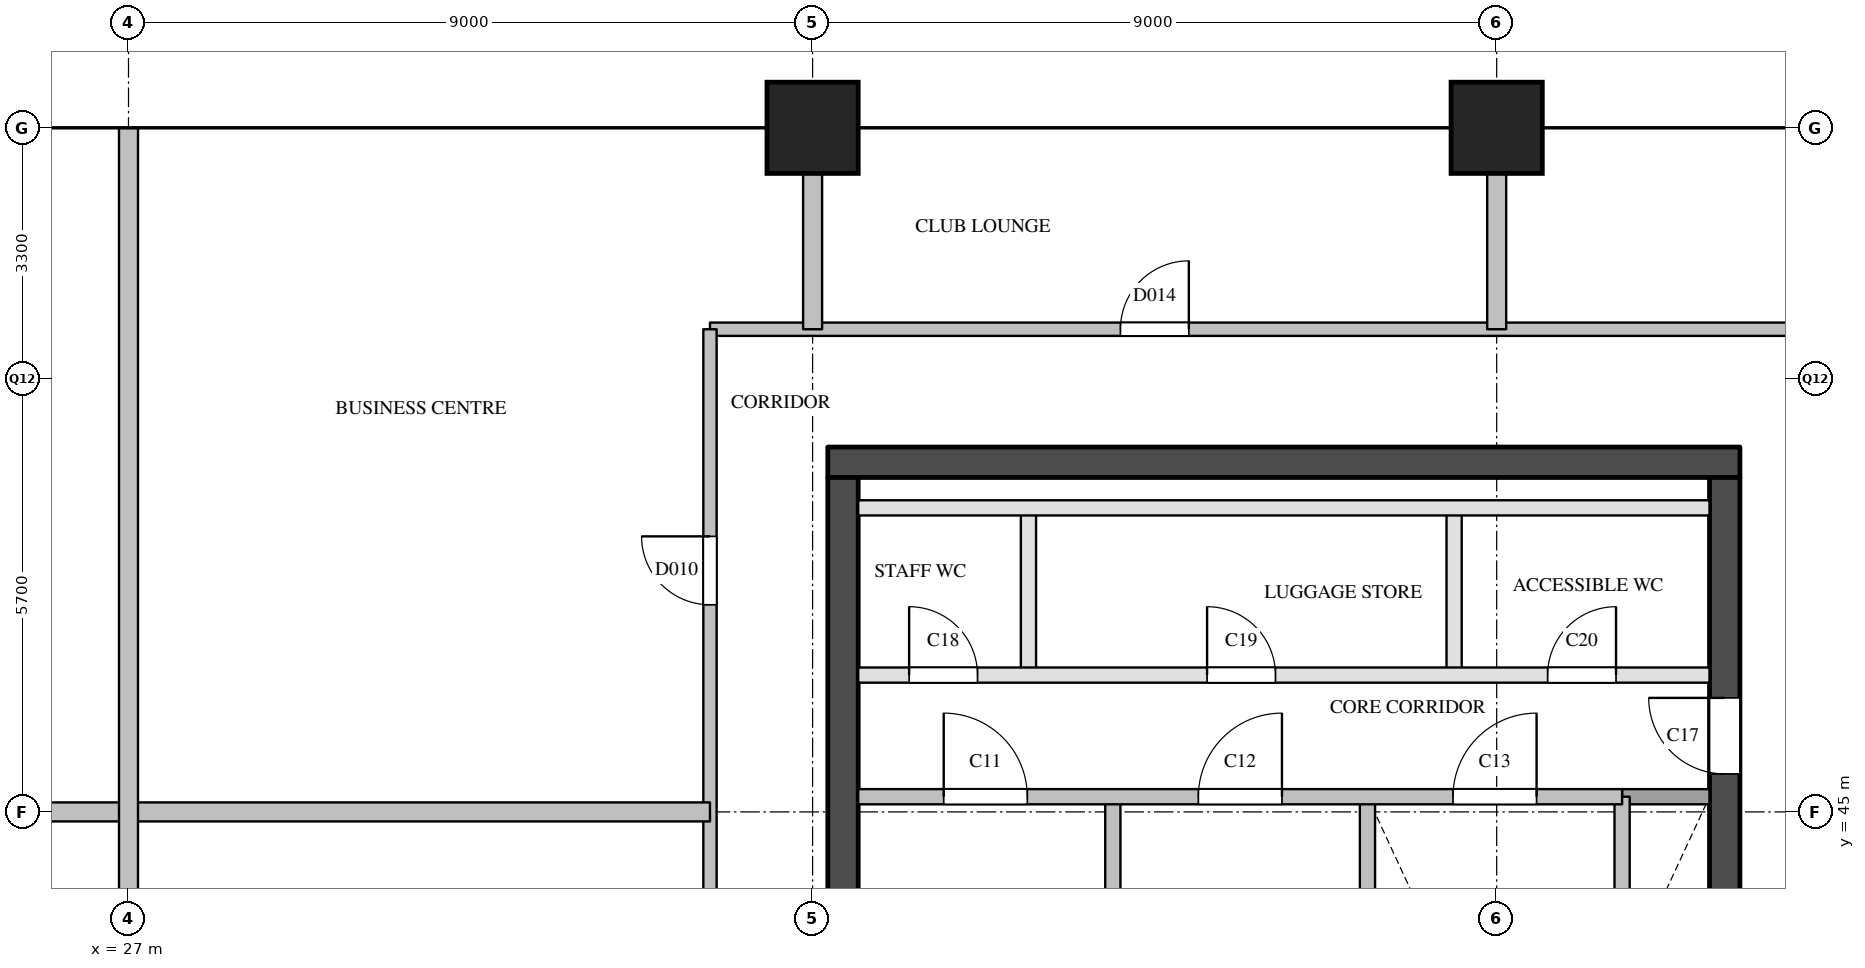
"""IFC4 building model, lengths in metres.
Left out: names, types, materials, properties, quantities, classifications, styles, units other than length and angle.
Written with IfcOpenShell. Run it as: python <this file> out.ifc"""

import sys

from ifc_helpers import new_model, si_unit, direction, frame, frame_2d, origin, origin_2d, place, context, subcontext, project, spatial, rectangle, extrude, element, fill, save


model = new_model("IFC4")
c1 = context("Model", 3, precision=1e-05, world=origin(), true_north=direction((0.0, 1.0)))
c2 = subcontext(c1, "Body", "Model", "MODEL_VIEW")
j1 = project(units=[si_unit("LENGTHUNIT", "METRE"), si_unit("PLANEANGLEUNIT", "RADIAN")], contexts=[c1])
p1 = place(None, origin())
s1 = spatial("IfcSite", under=j1, at=p1, CompositionType="ELEMENT")
p2 = place(p1, origin())
s2 = spatial("IfcBuilding", under=s1, at=p2, CompositionType="ELEMENT")
p3 = place(p2, frame((0.0, 0.0, 230.6)))
s3 = spatial("IfcBuildingStorey", under=s2, at=p3, CompositionType="ELEMENT", Elevation=230.6)
for number, where, z_axis, x_axis in (
    (1, (36.0, 54.0, 0.0), (0.0, 0.0, 1.0), (1.0, 0.0, 0.0)),
    (2, (45.0, 54.0, 0.0), (0.0, 0.0, 1.0), (1.0, 0.0, 0.0)),
):
    element("IfcColumn", number, at=place(p3, frame(where, z_axis=z_axis, x_axis=x_axis)), inside=s3, PredefinedType="COLUMN", context=c2, shape_type="SweptSolid", body=[
        extrude(rectangle(XDim=1.2, YDim=1.2, at=origin_2d()), origin(), (0.0, 0.0, 1.0), 3.9),
    ])
p4 = place(p3, frame((36.2, 49.6, 0.0), z_axis=(0.0, 0.0, 1.0), x_axis=(1.0, 0.0, 0.0)))
e3 = element("IfcWall", 3, at=p4, inside=s3, PredefinedType="SHEAR", context=c2, shape_type="SweptSolid", body=[
    extrude(rectangle(XDim=12.0, YDim=0.4, at=frame_2d((6.0, 0.0))), origin(), (0.0, 0.0, 1.0), 3.6),
])
p5 = place(p3, frame((36.4, 29.1, 0.0), z_axis=(0.0, 0.0, 1.0), x_axis=(0.0, 1.0, 0.0)))
e4 = element("IfcWall", 4, at=p5, inside=s3, PredefinedType="SHEAR", context=c2, shape_type="SweptSolid", body=[
    extrude(rectangle(XDim=20.3, YDim=0.4, at=frame_2d((10.15, 0.0))), origin(), (0.0, 0.0, 1.0), 3.6),
])
p6 = place(p5, frame((3.6, 0.0, 0.0)))
e5 = element("IfcOpeningElement", 5, at=p6, cuts=e4, PredefinedType="OPENING", context=c2, shape_type="SweptSolid", body=[
    extrude(rectangle(XDim=1.8, YDim=2.1, at=frame_2d((0.9, 1.05))), frame((0.0, 0.21, 0.0), z_axis=(0.0, -1.0, 0.0), x_axis=(1.0, 0.0, 0.0)), (0.0, 0.0, 1.0), 0.42),
])
p7 = place(p3, frame((48.0, 29.1, 0.0), z_axis=(0.0, 0.0, 1.0), x_axis=(0.0, 1.0, 0.0)))
e6 = element("IfcWall", 6, at=p7, inside=s3, PredefinedType="SHEAR", context=c2, shape_type="SweptSolid", body=[
    extrude(rectangle(XDim=20.3, YDim=0.4, at=frame_2d((10.15, 0.0))), origin(), (0.0, 0.0, 1.0), 3.6),
])
p8 = place(p7, frame((12.5, 0.0, 0.0)))
e7 = element("IfcOpeningElement", 7, at=p8, cuts=e6, PredefinedType="OPENING", context=c2, shape_type="SweptSolid", body=[
    extrude(rectangle(XDim=0.7, YDim=2.1, at=frame_2d((0.35, 1.05))), frame((0.0, 0.21, 0.0), z_axis=(0.0, -1.0, 0.0), x_axis=(1.0, 0.0, 0.0)), (0.0, 0.0, 1.0), 0.42),
])
p9 = place(p7, frame((3.9, 0.0, 0.0)))
e8 = element("IfcOpeningElement", 8, at=p9, cuts=e6, PredefinedType="OPENING", context=c2, shape_type="SweptSolid", body=[
    extrude(rectangle(XDim=1.8, YDim=2.1, at=frame_2d((0.9, 1.05))), frame((0.0, 0.21, 0.0), z_axis=(0.0, -1.0, 0.0), x_axis=(1.0, 0.0, 0.0)), (0.0, 0.0, 1.0), 0.42),
])
p10 = place(p7, frame((16.4, 0.0, 0.0)))
e9 = element("IfcOpeningElement", 9, at=p10, cuts=e6, PredefinedType="OPENING", context=c2, shape_type="SweptSolid", body=[
    extrude(rectangle(XDim=1.0, YDim=2.1, at=frame_2d((0.5, 1.05))), frame((0.0, 0.21, 0.0), z_axis=(0.0, -1.0, 0.0), x_axis=(1.0, 0.0, 0.0)), (0.0, 0.0, 1.0), 0.42),
])
p11 = place(p3, frame((38.84, 46.8, 0.0), z_axis=(0.0, 0.0, 1.0), x_axis=(0.0, 1.0, 0.0)))
e10 = element("IfcWall", 10, at=p11, inside=s3, PredefinedType="PARTITIONING", context=c2, shape_type="SweptSolid", body=[
    extrude(rectangle(XDim=2.2, YDim=0.2, at=frame_2d((1.1, 0.0))), origin(), (0.0, 0.0, 1.0), 3.6),
])
for number, where, z_axis, x_axis in (
    (11, (39.95, 40.78, 0.0), (0.0, 0.0, 1.0), (0.0, 1.0, 0.0)),
    (12, (43.3, 40.78, 0.0), (0.0, 0.0, 1.0), (0.0, 1.0, 0.0)),
):
    element("IfcWall", number, at=place(p3, frame(where, z_axis=z_axis, x_axis=x_axis)), inside=s3, PredefinedType="SOLIDWALL", context=c2, shape_type="SweptSolid", body=[
        extrude(rectangle(XDim=4.42, YDim=0.2, at=frame_2d((2.21, 0.0))), origin(), (0.0, 0.0, 1.0), 3.6),
    ])
p12 = place(p3, frame((44.44, 46.8, 0.0), z_axis=(0.0, 0.0, 1.0), x_axis=(0.0, 1.0, 0.0)))
e13 = element("IfcWall", 13, at=p12, inside=s3, PredefinedType="PARTITIONING", context=c2, shape_type="SweptSolid", body=[
    extrude(rectangle(XDim=2.2, YDim=0.2, at=frame_2d((1.1, 0.0))), origin(), (0.0, 0.0, 1.0), 3.6),
])
p13 = place(p3, frame((46.65, 40.78, 0.0), z_axis=(0.0, 0.0, 1.0), x_axis=(0.0, 1.0, 0.0)))
e14 = element("IfcWall", 14, at=p13, inside=s3, PredefinedType="SOLIDWALL", context=c2, shape_type="SweptSolid", body=[
    extrude(rectangle(XDim=4.42, YDim=0.2, at=frame_2d((2.21, 0.0))), origin(), (0.0, 0.0, 1.0), 3.6),
])
p14 = place(p3, frame((46.65, 45.2, 0.0), z_axis=(0.0, 0.0, 1.0), x_axis=(1.0, 0.0, 0.0)))
e15 = element("IfcWall", 15, at=p14, inside=s3, PredefinedType="SOLIDWALL", context=c2, shape_type="SweptSolid", body=[
    extrude(rectangle(XDim=1.15, YDim=0.2, at=frame_2d((0.575, 0.0))), origin(), (0.0, 0.0, 1.0), 3.6),
])
p15 = place(p3, frame((36.6, 45.2, 0.0), z_axis=(0.0, 0.0, 1.0), x_axis=(1.0, 0.0, 0.0)))
e16 = element("IfcWall", 16, at=p15, inside=s3, PredefinedType="SOLIDWALL", context=c2, shape_type="SweptSolid", body=[
    extrude(rectangle(XDim=10.05, YDim=0.2, at=frame_2d((5.025, 0.0))), origin(), (0.0, 0.0, 1.0), 3.6),
])
p16 = place(p15, frame((1.125, 0.0, 0.0)))
e17 = element("IfcOpeningElement", 17, at=p16, cuts=e16, PredefinedType="OPENING", context=c2, shape_type="SweptSolid", body=[
    extrude(rectangle(XDim=1.1, YDim=2.1, at=frame_2d((0.55, 1.05))), frame((0.0, 0.11, 0.0), z_axis=(0.0, -1.0, 0.0), x_axis=(1.0, 0.0, 0.0)), (0.0, 0.0, 1.0), 0.22),
])
p17 = place(p15, frame((4.475, 0.0, 0.0)))
e18 = element("IfcOpeningElement", 18, at=p17, cuts=e16, PredefinedType="OPENING", context=c2, shape_type="SweptSolid", body=[
    extrude(rectangle(XDim=1.1, YDim=2.1, at=frame_2d((0.55, 1.05))), frame((0.0, 0.11, 0.0), z_axis=(0.0, -1.0, 0.0), x_axis=(1.0, 0.0, 0.0)), (0.0, 0.0, 1.0), 0.22),
])
p18 = place(p15, frame((7.825, 0.0, 0.0)))
e19 = element("IfcOpeningElement", 19, at=p18, cuts=e16, PredefinedType="OPENING", context=c2, shape_type="SweptSolid", body=[
    extrude(rectangle(XDim=1.1, YDim=2.1, at=frame_2d((0.55, 1.05))), frame((0.0, 0.11, 0.0), z_axis=(0.0, -1.0, 0.0), x_axis=(1.0, 0.0, 0.0)), (0.0, 0.0, 1.0), 0.22),
])
p19 = place(p3, frame((36.6, 46.8, 0.0), z_axis=(0.0, 0.0, 1.0), x_axis=(1.0, 0.0, 0.0)))
e20 = element("IfcWall", 20, at=p19, inside=s3, PredefinedType="PARTITIONING", context=c2, shape_type="SweptSolid", body=[
    extrude(rectangle(XDim=11.2, YDim=0.2, at=frame_2d((5.6, 0.0))), origin(), (0.0, 0.0, 1.0), 3.6),
])
p20 = place(p19, frame((0.67, 0.0, 0.0)))
e21 = element("IfcOpeningElement", 21, at=p20, cuts=e20, PredefinedType="OPENING", context=c2, shape_type="SweptSolid", body=[
    extrude(rectangle(XDim=0.9, YDim=2.1, at=frame_2d((0.45, 1.05))), frame((0.0, 0.11, 0.0), z_axis=(0.0, -1.0, 0.0), x_axis=(1.0, 0.0, 0.0)), (0.0, 0.0, 1.0), 0.22),
])
p21 = place(p19, frame((4.59, 0.0, 0.0)))
e22 = element("IfcOpeningElement", 22, at=p21, cuts=e20, PredefinedType="OPENING", context=c2, shape_type="SweptSolid", body=[
    extrude(rectangle(XDim=0.9, YDim=2.1, at=frame_2d((0.45, 1.05))), frame((0.0, 0.11, 0.0), z_axis=(0.0, -1.0, 0.0), x_axis=(1.0, 0.0, 0.0)), (0.0, 0.0, 1.0), 0.22),
])
p22 = place(p19, frame((9.07, 0.0, 0.0)))
e23 = element("IfcOpeningElement", 23, at=p22, cuts=e20, PredefinedType="OPENING", context=c2, shape_type="SweptSolid", body=[
    extrude(rectangle(XDim=0.9, YDim=2.1, at=frame_2d((0.45, 1.05))), frame((0.0, 0.11, 0.0), z_axis=(0.0, -1.0, 0.0), x_axis=(1.0, 0.0, 0.0)), (0.0, 0.0, 1.0), 0.22),
])
p23 = place(p3, frame((36.6, 49.0, 0.0), z_axis=(0.0, 0.0, 1.0), x_axis=(1.0, 0.0, 0.0)))
e24 = element("IfcWall", 24, at=p23, inside=s3, PredefinedType="PARTITIONING", context=c2, shape_type="SweptSolid", body=[
    extrude(rectangle(XDim=11.2, YDim=0.2, at=frame_2d((5.6, 0.0))), origin(), (0.0, 0.0, 1.0), 3.6),
])
p24 = place(p3, frame((34.65, 51.35, 0.0), z_axis=(0.0, 0.0, 1.0), x_axis=(1.0, 0.0, 0.0)))
e25 = element("IfcWall", 25, at=p24, inside=s3, PredefinedType="PARTITIONING", context=c2, shape_type="SweptSolid", body=[
    extrude(rectangle(XDim=15.1, YDim=0.175, at=frame_2d((7.55, 0.0))), origin(), (0.0, 0.0, 1.0), 3.6),
])
p25 = place(p24, frame((5.4, 0.0, 0.0)))
e26 = element("IfcOpeningElement", 26, at=p25, cuts=e25, PredefinedType="OPENING", context=c2, shape_type="SweptSolid", body=[
    extrude(rectangle(XDim=0.9, YDim=2.1, at=frame_2d((0.45, 1.05))), frame((0.0, 0.097, 0.0), z_axis=(0.0, -1.0, 0.0), x_axis=(1.0, 0.0, 0.0)), (0.0, 0.0, 1.0), 0.195),
])
p26 = place(p3, frame((34.65, 28.5, 0.0), z_axis=(0.0, 0.0, 1.0), x_axis=(0.0, 1.0, 0.0)))
e27 = element("IfcWall", 27, at=p26, inside=s3, PredefinedType="PARTITIONING", context=c2, shape_type="SweptSolid", body=[
    extrude(rectangle(XDim=22.85, YDim=0.175, at=frame_2d((11.425, 0.0))), origin(), (0.0, 0.0, 1.0), 3.6),
])
p27 = place(p26, frame((3.3, 0.0, 0.0)))
e28 = element("IfcOpeningElement", 28, at=p27, cuts=e27, PredefinedType="OPENING", context=c2, shape_type="SweptSolid", body=[
    extrude(rectangle(XDim=0.9, YDim=2.1, at=frame_2d((0.45, 1.05))), frame((0.0, 0.097, 0.0), z_axis=(0.0, -1.0, 0.0), x_axis=(1.0, 0.0, 0.0)), (0.0, 0.0, 1.0), 0.195),
])
p28 = place(p26, frame((11.5, 0.0, 0.0)))
e29 = element("IfcOpeningElement", 29, at=p28, cuts=e27, PredefinedType="OPENING", context=c2, shape_type="SweptSolid", body=[
    extrude(rectangle(XDim=1.0, YDim=2.1, at=frame_2d((0.5, 1.05))), frame((0.0, 0.097, 0.0), z_axis=(0.0, -1.0, 0.0), x_axis=(1.0, 0.0, 0.0)), (0.0, 0.0, 1.0), 0.195),
])
p29 = place(p26, frame((19.225, 0.0, 0.0)))
e30 = element("IfcOpeningElement", 30, at=p29, cuts=e27, PredefinedType="OPENING", context=c2, shape_type="SweptSolid", body=[
    extrude(rectangle(XDim=0.9, YDim=2.1, at=frame_2d((0.45, 1.05))), frame((0.0, 0.097, 0.0), z_axis=(0.0, -1.0, 0.0), x_axis=(1.0, 0.0, 0.0)), (0.0, 0.0, 1.0), 0.195),
])
p30 = place(p3, frame((19.35, 45.0, 0.0), z_axis=(0.0, 0.0, 1.0), x_axis=(1.0, 0.0, 0.0)))
e31 = element("IfcWall", 31, at=p30, inside=s3, PredefinedType="PARTITIONING", context=c2, shape_type="SweptSolid", body=[
    extrude(rectangle(XDim=15.3, YDim=0.25, at=frame_2d((7.65, 0.0))), origin(), (0.0, 0.0, 1.0), 3.6),
])
p31 = place(p3, frame((27.0, 36.0, 0.0), z_axis=(0.0, 0.0, 1.0), x_axis=(0.0, 1.0, 0.0)))
e32 = element("IfcWall", 32, at=p31, inside=s3, PredefinedType="PARTITIONING", context=c2, shape_type="SweptSolid", body=[
    extrude(rectangle(XDim=18.0, YDim=0.25, at=frame_2d((9.0, 0.0))), origin(), (0.0, 0.0, 1.0), 3.6),
])
for number, where, z_axis, x_axis in (
    (33, (36.0, 51.35, 0.0), (0.0, 0.0, 1.0), (0.0, 1.0, 0.0)),
    (34, (45.0, 51.35, 0.0), (0.0, 0.0, 1.0), (0.0, 1.0, 0.0)),
):
    element("IfcWall", number, at=place(p3, frame(where, z_axis=z_axis, x_axis=x_axis)), inside=s3, PredefinedType="PARTITIONING", context=c2, shape_type="SweptSolid", body=[
        extrude(rectangle(XDim=2.65, YDim=0.25, at=frame_2d((1.325, 0.0))), origin(), (0.0, 0.0, 1.0), 3.6),
    ])
p32 = place(p16, origin())
e35 = element("IfcDoor", 35, at=p32, inside=s3, OperationType="SINGLE_SWING_LEFT", PredefinedType="DOOR", context=c2, shape_type="SweptSolid", body=[
    extrude(rectangle(XDim=1.1, YDim=2.1, at=frame_2d((0.55, 1.05))), frame((0.0, 0.025, 0.0), z_axis=(0.0, -1.0, 0.0), x_axis=(1.0, 0.0, 0.0)), (0.0, 0.0, 1.0), 0.05),
])
fill(e17, e35)
p33 = place(p17, origin())
e36 = element("IfcDoor", 36, at=p33, inside=s3, OperationType="SINGLE_SWING_RIGHT", PredefinedType="DOOR", context=c2, shape_type="SweptSolid", body=[
    extrude(rectangle(XDim=1.1, YDim=2.1, at=frame_2d((0.55, 1.05))), frame((0.0, 0.025, 0.0), z_axis=(0.0, -1.0, 0.0), x_axis=(1.0, 0.0, 0.0)), (0.0, 0.0, 1.0), 0.05),
])
fill(e18, e36)
p34 = place(p18, origin())
e37 = element("IfcDoor", 37, at=p34, inside=s3, OperationType="SINGLE_SWING_RIGHT", PredefinedType="DOOR", context=c2, shape_type="SweptSolid", body=[
    extrude(rectangle(XDim=1.1, YDim=2.1, at=frame_2d((0.55, 1.05))), frame((0.0, 0.025, 0.0), z_axis=(0.0, -1.0, 0.0), x_axis=(1.0, 0.0, 0.0)), (0.0, 0.0, 1.0), 0.05),
])
fill(e19, e37)
p35 = place(p10, origin())
e38 = element("IfcDoor", 38, at=p35, inside=s3, OperationType="SINGLE_SWING_RIGHT", PredefinedType="DOOR", context=c2, shape_type="SweptSolid", body=[
    extrude(rectangle(XDim=1.0, YDim=2.1, at=frame_2d((0.5, 1.05))), frame((0.0, 0.025, 0.0), z_axis=(0.0, -1.0, 0.0), x_axis=(1.0, 0.0, 0.0)), (0.0, 0.0, 1.0), 0.05),
])
fill(e9, e38)
p36 = place(p20, origin())
e39 = element("IfcDoor", 39, at=p36, inside=s3, OperationType="SINGLE_SWING_LEFT", PredefinedType="DOOR", context=c2, shape_type="SweptSolid", body=[
    extrude(rectangle(XDim=0.9, YDim=2.1, at=frame_2d((0.45, 1.05))), frame((0.0, 0.025, 0.0), z_axis=(0.0, -1.0, 0.0), x_axis=(1.0, 0.0, 0.0)), (0.0, 0.0, 1.0), 0.05),
])
fill(e21, e39)
p37 = place(p21, origin())
e40 = element("IfcDoor", 40, at=p37, inside=s3, OperationType="SINGLE_SWING_LEFT", PredefinedType="DOOR", context=c2, shape_type="SweptSolid", body=[
    extrude(rectangle(XDim=0.9, YDim=2.1, at=frame_2d((0.45, 1.05))), frame((0.0, 0.025, 0.0), z_axis=(0.0, -1.0, 0.0), x_axis=(1.0, 0.0, 0.0)), (0.0, 0.0, 1.0), 0.05),
])
fill(e22, e40)
p38 = place(p22, origin())
e41 = element("IfcDoor", 41, at=p38, inside=s3, OperationType="SINGLE_SWING_RIGHT", PredefinedType="DOOR", context=c2, shape_type="SweptSolid", body=[
    extrude(rectangle(XDim=0.9, YDim=2.1, at=frame_2d((0.45, 1.05))), frame((0.0, 0.025, 0.0), z_axis=(0.0, -1.0, 0.0), x_axis=(1.0, 0.0, 0.0)), (0.0, 0.0, 1.0), 0.05),
])
fill(e23, e41)
p39 = place(p29, origin())
e42 = element("IfcDoor", 42, at=p39, inside=s3, OperationType="SINGLE_SWING_RIGHT", PredefinedType="DOOR", context=c2, shape_type="SweptSolid", body=[
    extrude(rectangle(XDim=0.9, YDim=2.1, at=frame_2d((0.45, 1.05))), frame((0.0, 0.025, 0.0), z_axis=(0.0, -1.0, 0.0), x_axis=(1.0, 0.0, 0.0)), (0.0, 0.0, 1.0), 0.05),
])
fill(e30, e42)
p40 = place(p25, origin())
e43 = element("IfcDoor", 43, at=p40, inside=s3, OperationType="SINGLE_SWING_RIGHT", PredefinedType="DOOR", context=c2, shape_type="SweptSolid", body=[
    extrude(rectangle(XDim=0.9, YDim=2.1, at=frame_2d((0.45, 1.05))), frame((0.0, 0.025, 0.0), z_axis=(0.0, -1.0, 0.0), x_axis=(1.0, 0.0, 0.0)), (0.0, 0.0, 1.0), 0.05),
])
fill(e26, e43)
save(model, sys.argv[1])
